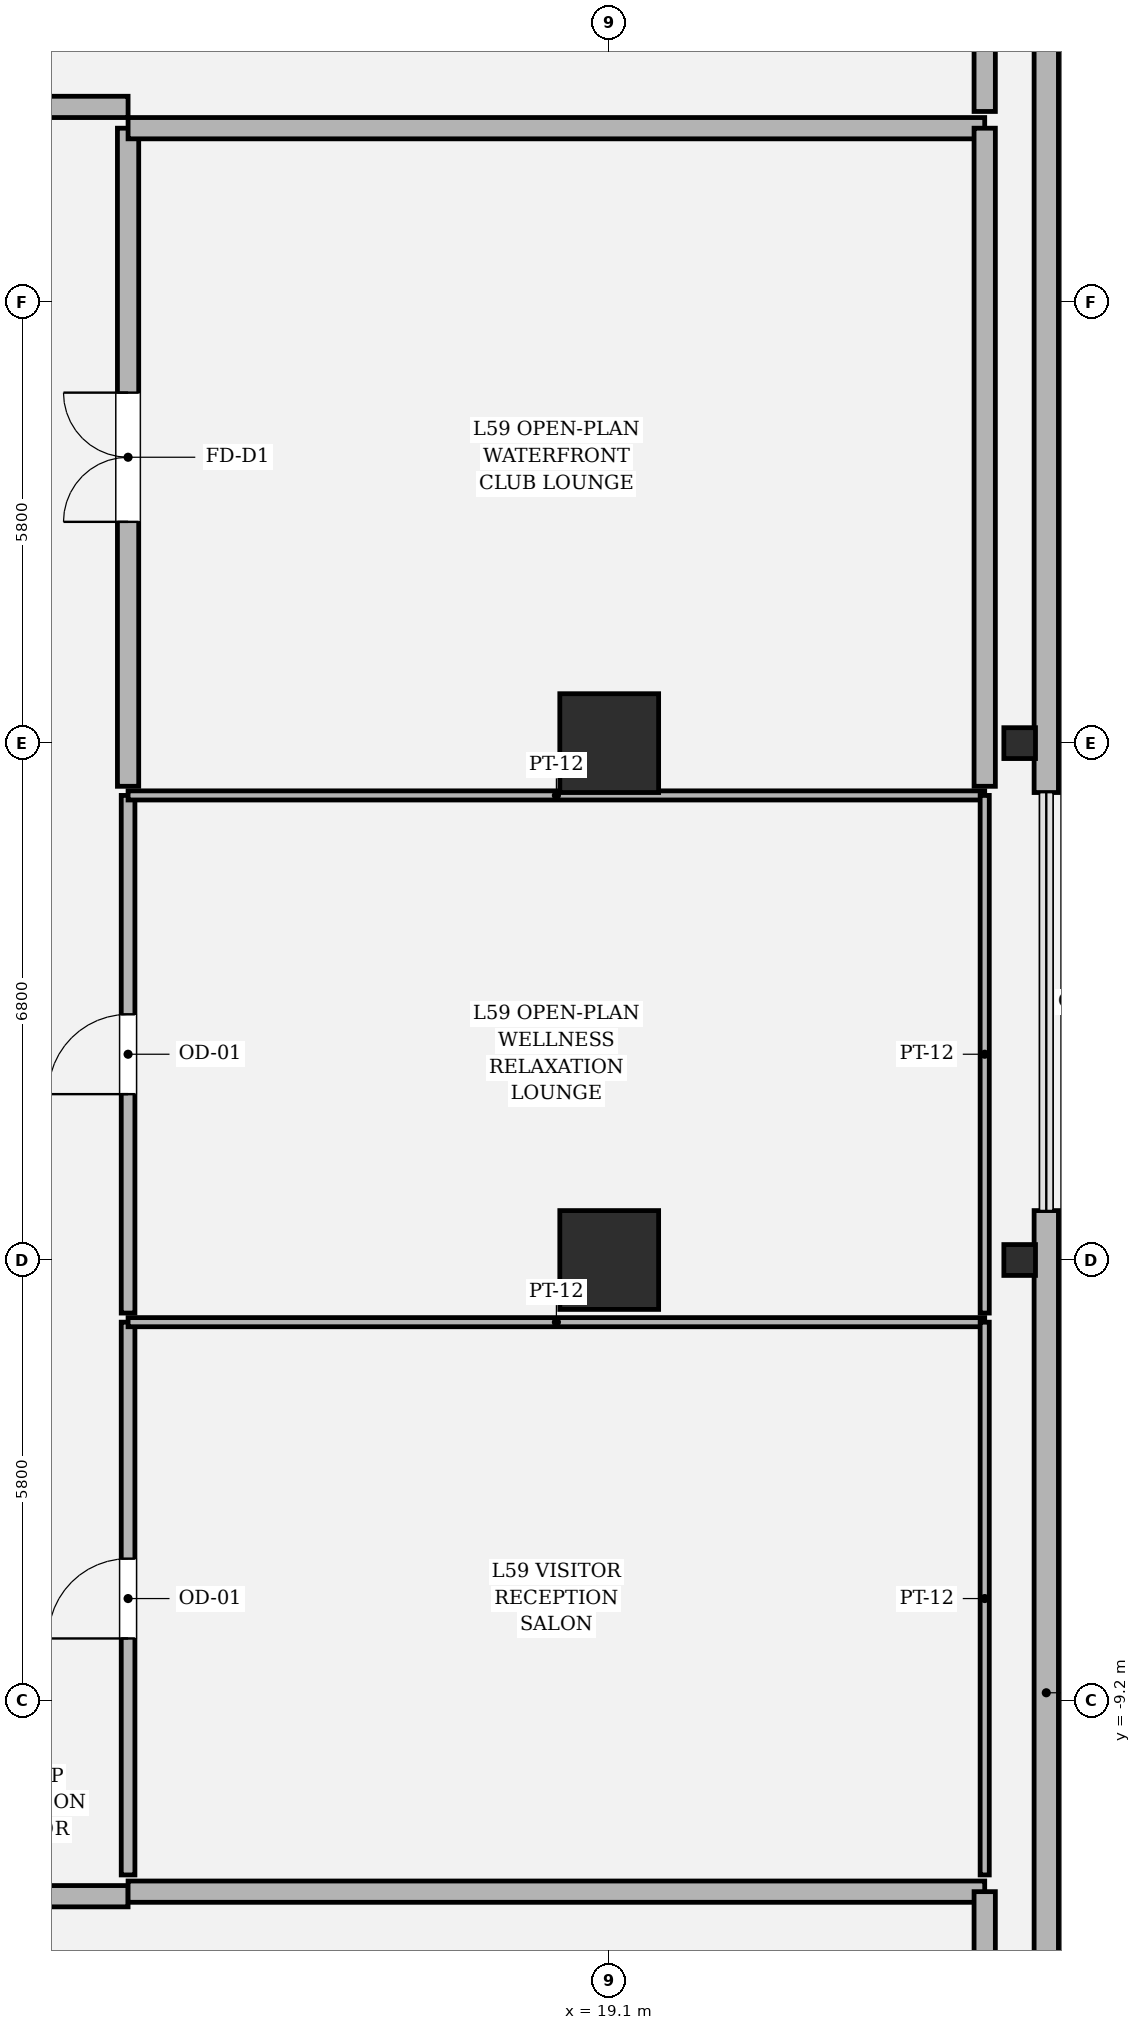
"""IFC4 building model, lengths in metres.
Left out: names, types, materials, properties, quantities, classifications, styles, units other than length and angle.
Written with IfcOpenShell. Run it as: python <this file> out.ifc"""

import sys

from ifc_helpers import new_model, si_unit, direction, frame, frame_2d, origin, origin_2d, place, context, subcontext, project, spatial, rectangle, hollow_rectangle, i_section, extrude, element, fill, save


model = new_model("IFC4")
c1 = context("Model", 3, precision=1e-05, world=origin(), true_north=direction((0.0, 1.0)))
c2 = subcontext(c1, "Body", "Model", "MODEL_VIEW")
j1 = project(units=[si_unit("LENGTHUNIT", "METRE"), si_unit("PLANEANGLEUNIT", "RADIAN")], contexts=[c1])
p1 = place(None, origin())
s1 = spatial("IfcSite", under=j1, at=p1, CompositionType="ELEMENT")
p2 = place(p1, origin())
s2 = spatial("IfcBuilding", under=s1, at=p2, CompositionType="ELEMENT")
p3 = place(p2, frame((0.0, 0.0, 251.4)))
s3 = spatial("IfcBuildingStorey", under=s2, at=p3, CompositionType="ELEMENT", Elevation=251.4)
for number, where, z_axis, x_axis in (
    (1, (19.1, -3.4, 0.0), (0.0, 0.0, 1.0), (1.0, 0.0, 0.0)),
    (2, (19.1, 3.4, 0.0), (0.0, 0.0, 1.0), (1.0, 0.0, 0.0)),
):
    element("IfcColumn", number, at=place(p3, frame(where, z_axis=z_axis, x_axis=x_axis)), inside=s3, PredefinedType="COLUMN", context=c2, shape_type="SweptSolid", body=[
        extrude(hollow_rectangle(XDim=1.3, YDim=1.3, WallThickness=0.038, at=origin_2d()), origin(), (0.0, 0.0, 1.0), 4.05),
    ])
for number, where, z_axis, x_axis in (
    (3, (24.5, -3.4, 0.0), (0.0, 0.0, 1.0), (0.0, 1.0, 0.0)),
    (4, (24.5, 3.4, 0.0), (0.0, 0.0, 1.0), (0.0, 1.0, 0.0)),
):
    element("IfcColumn", number, at=place(p3, frame(where, z_axis=z_axis, x_axis=x_axis)), inside=s3, PredefinedType="COLUMN", context=c2, shape_type="SweptSolid", body=[
        extrude(i_section(OverallWidth=0.406, OverallDepth=0.416, WebThickness=0.029, FlangeThickness=0.048, FilletRadius=0.018, at=origin_2d()), origin(), (0.0, 0.0, 1.0), 4.048),
    ])
p4 = place(p3, frame((24.85, -15.437, 0.0), z_axis=(0.0, 0.0, 1.0), x_axis=(0.0, 1.0, 0.0)))
e5 = element("IfcWall", 5, at=p4, inside=s3, PredefinedType="SOLIDWALL", context=c2, shape_type="SweptSolid", body=[
    extrude(rectangle(XDim=12.687, YDim=0.32, at=frame_2d((6.344, 0.0))), origin(), (0.0, 0.0, 1.0), 2.564),
])
p5 = place(p3, frame((24.85, 2.75, 0.0), z_axis=(0.0, 0.0, 1.0), x_axis=(0.0, 1.0, 0.0)))
e6 = element("IfcWall", 6, at=p5, inside=s3, PredefinedType="SOLIDWALL", context=c2, shape_type="SweptSolid", body=[
    extrude(rectangle(XDim=17.487, YDim=0.32, at=frame_2d((8.743, 0.0))), origin(), (0.0, 0.0, 1.0), 2.564),
])
p6 = place(p3, frame((-4.485, -11.77, 0.0), z_axis=(0.0, 0.0, 1.0), x_axis=(1.0, 0.0, 0.0)))
e7 = element("IfcWall", 7, at=p6, inside=s3, PredefinedType="SOLIDWALL", context=c2, shape_type="SweptSolid", body=[
    extrude(rectangle(XDim=17.255, YDim=0.28, at=frame_2d((8.627, 0.0))), origin(), (0.0, 0.0, 1.0), 3.244),
])
p7 = place(p6, frame((7.778, 0.0, 0.0)))
e8 = element("IfcOpeningElement", 8, at=p7, cuts=e7, PredefinedType="OPENING", context=c2, shape_type="SweptSolid", body=[
    extrude(rectangle(XDim=1.7, YDim=2.3, at=frame_2d((0.85, 1.15))), frame((0.0, 0.15, 0.0), z_axis=(0.0, -1.0, 0.0), x_axis=(1.0, 0.0, 0.0)), (0.0, 0.0, 1.0), 0.3),
])
p8 = place(p3, frame((12.77, -11.71, 0.0), z_axis=(0.0, 0.0, 1.0), x_axis=(1.0, 0.0, 0.0)))
e9 = element("IfcWall", 9, at=p8, inside=s3, PredefinedType="SOLIDWALL", context=c2, shape_type="SweptSolid", body=[
    extrude(rectangle(XDim=11.27, YDim=0.28, at=frame_2d((5.635, 0.0))), origin(), (0.0, 0.0, 1.0), 3.244),
])
p9 = place(p3, frame((24.04, -11.71, 0.0), z_axis=(0.0, 0.0, 1.0), x_axis=(0.0, -1.0, 0.0)))
e10 = element("IfcWall", 10, at=p9, inside=s3, PredefinedType="SOLIDWALL", context=c2, shape_type="SweptSolid", body=[
    extrude(rectangle(XDim=4.83, YDim=0.28, at=frame_2d((2.415, 0.0))), origin(), (0.0, 0.0, 1.0), 3.85),
])
p10 = place(p3, frame((12.77, -11.49, 0.0), z_axis=(0.0, 0.0, 1.0), x_axis=(0.0, 1.0, 0.0)))
e11 = element("IfcWall", 11, at=p10, inside=s3, PredefinedType="PARTITIONING", context=c2, shape_type="SweptSolid", body=[
    extrude(rectangle(XDim=7.272, YDim=0.18, at=frame_2d((3.636, 0.0))), origin(), (0.0, 0.0, 1.0), 3.244),
])
p11 = place(p10, frame((3.111, 0.0, 0.0)))
e12 = element("IfcOpeningElement", 12, at=p11, cuts=e11, PredefinedType="OPENING", context=c2, shape_type="SweptSolid", body=[
    extrude(rectangle(XDim=1.05, YDim=2.2, at=frame_2d((0.525, 1.1))), frame((0.0, 0.1, 0.0), z_axis=(0.0, -1.0, 0.0), x_axis=(1.0, 0.0, 0.0)), (0.0, 0.0, 1.0), 0.2),
])
p12 = place(p3, frame((12.77, -4.218, 0.0), z_axis=(0.0, 0.0, 1.0), x_axis=(1.0, 0.0, 0.0)))
e13 = element("IfcWall", 13, at=p12, inside=s3, PredefinedType="PARTITIONING", context=c2, shape_type="SweptSolid", body=[
    extrude(rectangle(XDim=11.27, YDim=0.12, at=frame_2d((5.635, 0.0))), origin(), (0.0, 0.0, 1.0), 3.244),
])
p13 = place(p3, frame((24.04, -4.218, 0.0), z_axis=(0.0, 0.0, 1.0), x_axis=(0.0, -1.0, 0.0)))
e14 = element("IfcWall", 14, at=p13, inside=s3, PredefinedType="PARTITIONING", context=c2, shape_type="SweptSolid", body=[
    extrude(rectangle(XDim=7.272, YDim=0.12, at=frame_2d((3.636, 0.0))), origin(), (0.0, 0.0, 1.0), 3.85),
])
p14 = place(p3, frame((12.77, -4.098, 0.0), z_axis=(0.0, 0.0, 1.0), x_axis=(0.0, 1.0, 0.0)))
e15 = element("IfcWall", 15, at=p14, inside=s3, PredefinedType="PARTITIONING", context=c2, shape_type="SweptSolid", body=[
    extrude(rectangle(XDim=6.81, YDim=0.18, at=frame_2d((3.405, 0.0))), origin(), (0.0, 0.0, 1.0), 3.244),
])
p15 = place(p14, frame((2.88, 0.0, 0.0)))
e16 = element("IfcOpeningElement", 16, at=p15, cuts=e15, PredefinedType="OPENING", context=c2, shape_type="SweptSolid", body=[
    extrude(rectangle(XDim=1.05, YDim=2.2, at=frame_2d((0.525, 1.1))), frame((0.0, 0.1, 0.0), z_axis=(0.0, -1.0, 0.0), x_axis=(1.0, 0.0, 0.0)), (0.0, 0.0, 1.0), 0.2),
])
p16 = place(p3, frame((12.77, 2.712, 0.0), z_axis=(0.0, 0.0, 1.0), x_axis=(1.0, 0.0, 0.0)))
e17 = element("IfcWall", 17, at=p16, inside=s3, PredefinedType="PARTITIONING", context=c2, shape_type="SweptSolid", body=[
    extrude(rectangle(XDim=11.27, YDim=0.12, at=frame_2d((5.635, 0.0))), origin(), (0.0, 0.0, 1.0), 3.244),
])
p17 = place(p3, frame((24.04, 2.712, 0.0), z_axis=(0.0, 0.0, 1.0), x_axis=(0.0, -1.0, 0.0)))
e18 = element("IfcWall", 18, at=p17, inside=s3, PredefinedType="PARTITIONING", context=c2, shape_type="SweptSolid", body=[
    extrude(rectangle(XDim=6.81, YDim=0.12, at=frame_2d((3.405, 0.0))), origin(), (0.0, 0.0, 1.0), 2.524),
])
p18 = place(p3, frame((12.77, 2.832, 0.0), z_axis=(0.0, 0.0, 1.0), x_axis=(0.0, 1.0, 0.0)))
e19 = element("IfcWall", 19, at=p18, inside=s3, PredefinedType="SOLIDWALL", context=c2, shape_type="SweptSolid", body=[
    extrude(rectangle(XDim=8.658, YDim=0.28, at=frame_2d((4.329, 0.0))), origin(), (0.0, 0.0, 1.0), 3.244),
])
p19 = place(p18, frame((3.479, 0.0, 0.0)))
e20 = element("IfcOpeningElement", 20, at=p19, cuts=e19, PredefinedType="OPENING", context=c2, shape_type="SweptSolid", body=[
    extrude(rectangle(XDim=1.7, YDim=2.3, at=frame_2d((0.85, 1.15))), frame((0.0, 0.15, 0.0), z_axis=(0.0, -1.0, 0.0), x_axis=(1.0, 0.0, 0.0)), (0.0, 0.0, 1.0), 0.3),
])
p20 = place(p3, frame((12.77, 11.49, 0.0), z_axis=(0.0, 0.0, 1.0), x_axis=(1.0, 0.0, 0.0)))
e21 = element("IfcWall", 21, at=p20, inside=s3, PredefinedType="SOLIDWALL", context=c2, shape_type="SweptSolid", body=[
    extrude(rectangle(XDim=11.27, YDim=0.28, at=frame_2d((5.635, 0.0))), origin(), (0.0, 0.0, 1.0), 3.244),
])
p21 = place(p3, frame((24.04, 11.49, 0.0), z_axis=(0.0, 0.0, 1.0), x_axis=(0.0, -1.0, 0.0)))
e22 = element("IfcWall", 22, at=p21, inside=s3, PredefinedType="SOLIDWALL", context=c2, shape_type="SweptSolid", body=[
    extrude(rectangle(XDim=8.658, YDim=0.28, at=frame_2d((4.329, 0.0))), origin(), (0.0, 0.0, 1.0), 2.524),
])
p22 = place(p3, frame((12.77, 11.77, 0.0), z_axis=(0.0, 0.0, 1.0), x_axis=(-1.0, 0.0, 0.0)))
e23 = element("IfcWall", 23, at=p22, inside=s3, PredefinedType="SOLIDWALL", context=c2, shape_type="SweptSolid", body=[
    extrude(rectangle(XDim=18.644, YDim=0.28, at=frame_2d((9.322, 0.0))), origin(), (0.0, 0.0, 1.0), 3.244),
])
p23 = place(p22, frame((8.472, 0.0, 0.0)))
e24 = element("IfcOpeningElement", 24, at=p23, cuts=e23, PredefinedType="OPENING", context=c2, shape_type="SweptSolid", body=[
    extrude(rectangle(XDim=1.7, YDim=2.3, at=frame_2d((0.85, 1.15))), frame((0.0, 0.15, 0.0), z_axis=(0.0, -1.0, 0.0), x_axis=(1.0, 0.0, 0.0)), (0.0, 0.0, 1.0), 0.3),
])
p24 = place(p3, frame((24.04, 22.147, 0.0), z_axis=(0.0, 0.0, 1.0), x_axis=(0.0, -1.0, 0.0)))
e25 = element("IfcWall", 25, at=p24, inside=s3, PredefinedType="SOLIDWALL", context=c2, shape_type="SweptSolid", body=[
    extrude(rectangle(XDim=10.438, YDim=0.28, at=frame_2d((5.219, 0.0))), origin(), (0.0, 0.0, 1.0), 2.524),
])
p25 = place(p11, origin())
e26 = element("IfcDoor", 26, at=p25, inside=s3, OperationType="SINGLE_SWING_LEFT", PredefinedType="DOOR", context=c2, shape_type="SweptSolid", body=[
    extrude(rectangle(XDim=1.05, YDim=2.2, at=frame_2d((0.525, 1.1))), frame((0.0, 0.025, 0.0), z_axis=(0.0, -1.0, 0.0), x_axis=(1.0, 0.0, 0.0)), (0.0, 0.0, 1.0), 0.05),
])
fill(e12, e26)
p26 = place(p15, origin())
e27 = element("IfcDoor", 27, at=p26, inside=s3, OperationType="SINGLE_SWING_LEFT", PredefinedType="DOOR", context=c2, shape_type="SweptSolid", body=[
    extrude(rectangle(XDim=1.05, YDim=2.2, at=frame_2d((0.525, 1.1))), frame((0.0, 0.025, 0.0), z_axis=(0.0, -1.0, 0.0), x_axis=(1.0, 0.0, 0.0)), (0.0, 0.0, 1.0), 0.05),
])
fill(e16, e27)
p27 = place(p19, origin())
e28 = element("IfcDoor", 28, at=p27, inside=s3, OperationType="DOUBLE_DOOR_SINGLE_SWING", PredefinedType="DOOR", context=c2, shape_type="SweptSolid", body=[
    extrude(rectangle(XDim=1.7, YDim=2.3, at=frame_2d((0.85, 1.15))), frame((0.0, 0.025, 0.0), z_axis=(0.0, -1.0, 0.0), x_axis=(1.0, 0.0, 0.0)), (0.0, 0.0, 1.0), 0.05),
])
fill(e20, e28)
save(model, sys.argv[1])
